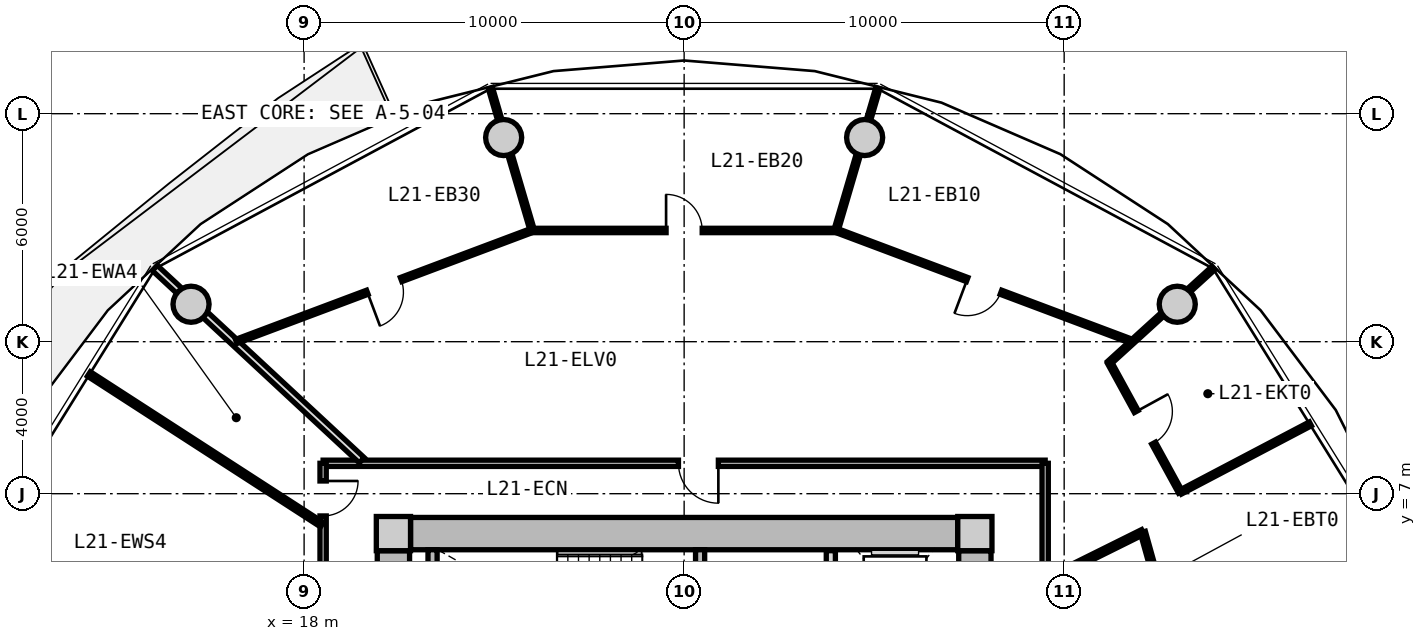
"""IFC4 building model, lengths in metres.
Left out: names, types, materials, properties, quantities, classifications, styles, units other than length and angle.
Written with IfcOpenShell. Run it as: python <this file> out.ifc"""

import sys

from ifc_helpers import new_model, si_unit, direction, frame, frame_2d, origin, origin_2d, place, context, subcontext, project, spatial, rectangle, circle, extrude, source, transform, mapped, element, fill, save


model = new_model("IFC4")
c1 = context("Model", 3, precision=1e-05, world=origin(), true_north=direction((0.0, 1.0)))
c2 = subcontext(c1, "Body", "Model", "MODEL_VIEW")
j1 = project(units=[si_unit("LENGTHUNIT", "METRE"), si_unit("PLANEANGLEUNIT", "RADIAN")], contexts=[c1])
p1 = place(None, origin())
s1 = spatial("IfcSite", under=j1, at=p1, CompositionType="ELEMENT")
p2 = place(p1, origin())
s2 = spatial("IfcBuilding", under=s1, at=p2, CompositionType="ELEMENT")
p3 = place(p2, frame((0.0, 0.0, 70.4)))
s3 = spatial("IfcBuildingStorey", under=s2, at=p3, CompositionType="ELEMENT", Elevation=70.4)
m1 = source(origin(), c2, "Body", "SweptSolid", [
    extrude(rectangle(XDim=0.9, YDim=0.9, at=origin_2d()), origin(), (0.0, 0.0, 1.0), 3.05),
])
for number, where, z_axis, x_axis in (
    (1, (35.65, 5.95, 0.0), (0.0, 0.0, 1.0), (1.0, 0.0, 0.0)),
    (2, (20.35, 5.95, 0.0), (0.0, 0.0, 1.0), (1.0, 0.0, 0.0)),
):
    element("IfcColumn", number, at=place(p3, frame(where, z_axis=z_axis, x_axis=x_axis)), inside=s3, PredefinedType="COLUMN", context=c2, shape_type="MappedRepresentation", body=[
        mapped(m1, transform((0.0, 0.0, 0.0), x_axis=(1.0, 0.0, 0.0), y_axis=(0.0, 1.0, 0.0), z_axis=(0.0, 0.0, 1.0), scale=1.0)),
    ])
m2 = source(origin(), c2, "Body", "SweptSolid", [
    extrude(rectangle(XDim=14.4, YDim=0.85, at=frame_2d((7.2, 0.0))), origin(), (0.0, 0.0, 1.0), 2.73),
])
p4 = place(p3, frame((20.8, 5.95, 0.0), z_axis=(0.0, 0.0, 1.0), x_axis=(1.0, 0.0, 0.0)))
e3 = element("IfcWall", 3, at=p4, inside=s3, PredefinedType="SHEAR", context=c2, shape_type="MappedRepresentation", body=[
    mapped(m2, transform((0.0, 0.0, 0.0), x_axis=(1.0, 0.0, 0.0), y_axis=(0.0, 1.0, 0.0), z_axis=(0.0, 0.0, 1.0), scale=1.0)),
])
m3 = source(origin(), c2, "Body", "SweptSolid", [
    extrude(rectangle(XDim=11.0, YDim=0.85, at=frame_2d((5.5, 0.0))), origin(), (0.0, 0.0, 1.0), 2.73),
])
p5 = place(p3, frame((20.35, -5.5, 0.0), z_axis=(0.0, 0.0, 1.0), x_axis=(0.0, 1.0, 0.0)))
e4 = element("IfcWall", 4, at=p5, inside=s3, PredefinedType="SHEAR", context=c2, shape_type="MappedRepresentation", body=[
    mapped(m3, transform((0.0, 0.0, 0.0), x_axis=(1.0, 0.0, 0.0), y_axis=(0.0, 1.0, 0.0), z_axis=(0.0, 0.0, 1.0), scale=1.0)),
])
p6 = place(p5, frame((3.8, 0.0, 0.0)))
e5 = element("IfcOpeningElement", 5, at=p6, cuts=e4, PredefinedType="OPENING", context=c2, shape_type="SweptSolid", body=[
    extrude(rectangle(XDim=1.2, YDim=2.15, at=frame_2d((0.6, 1.075))), frame((0.0, 0.435, 0.0), z_axis=(0.0, -1.0, 0.0), x_axis=(1.0, 0.0, 0.0)), (0.0, 0.0, 1.0), 0.87),
])
p7 = place(p3, frame((35.65, 5.5, 0.0), z_axis=(0.0, 0.0, 1.0), x_axis=(0.0, -1.0, 0.0)))
e6 = element("IfcWall", 6, at=p7, inside=s3, PredefinedType="SHEAR", context=c2, shape_type="MappedRepresentation", body=[
    mapped(m3, transform((0.0, 0.0, 0.0), x_axis=(1.0, 0.0, 0.0), y_axis=(0.0, 1.0, 0.0), z_axis=(0.0, 0.0, 1.0), scale=1.0)),
])
p8 = place(p7, frame((5.65, 0.0, 0.0)))
e7 = element("IfcOpeningElement", 7, at=p8, cuts=e6, PredefinedType="OPENING", context=c2, shape_type="SweptSolid", body=[
    extrude(rectangle(XDim=1.2, YDim=2.15, at=frame_2d((0.6, 1.075))), frame((0.0, 0.435, 0.0), z_axis=(0.0, -1.0, 0.0), x_axis=(1.0, 0.0, 0.0)), (0.0, 0.0, 1.0), 0.87),
])
m4 = source(origin(), c2, "Body", "SweptSolid", [
    extrude(circle(Radius=0.475, at=origin_2d()), origin(), (0.0, 0.0, 1.0), 3.05),
])
for number, where, z_axis, x_axis in (
    (8, (40.975, 11.985, 0.0), (0.0, 0.0, 1.0), (1.0, 0.0, 0.0)),
    (9, (32.749, 16.373, 0.0), (0.0, 0.0, 1.0), (1.0, 0.0, 0.0)),
    (10, (23.251, 16.373, 0.0), (0.0, 0.0, 1.0), (1.0, 0.0, 0.0)),
    (11, (15.025, 11.985, 0.0), (0.0, 0.0, 1.0), (1.0, 0.0, 0.0)),
):
    element("IfcColumn", number, at=place(p3, frame(where, z_axis=z_axis, x_axis=x_axis)), inside=s3, PredefinedType="COLUMN", context=c2, shape_type="MappedRepresentation", body=[
        mapped(m4, transform((0.0, 0.0, 0.0), x_axis=(1.0, 0.0, 0.0), y_axis=(0.0, 1.0, 0.0), z_axis=(0.0, 0.0, 1.0), scale=1.0)),
    ])
m5 = source(origin(), c2, "Body", "SweptSolid", [
    extrude(rectangle(XDim=3.075, YDim=0.24, at=frame_2d((1.538, 0.0))), origin(), (0.0, 0.0, 1.0), 2.73),
])
p9 = place(p3, frame((21.38, 2.45, 0.0), z_axis=(0.0, 0.0, 1.0), x_axis=(0.0, 1.0, 0.0)))
e12 = element("IfcWall", 12, at=p9, inside=s3, PredefinedType="PARTITIONING", context=c2, shape_type="MappedRepresentation", body=[
    mapped(m5, transform((0.0, 0.0, 0.0), x_axis=(1.0, 0.0, 0.0), y_axis=(0.0, 1.0, 0.0), z_axis=(0.0, 0.0, 1.0), scale=1.0)),
])
p10 = place(p3, frame((28.42, 2.45, 0.0), z_axis=(0.0, 0.0, 1.0), x_axis=(0.0, 1.0, 0.0)))
e13 = element("IfcWall", 13, at=p10, inside=s3, PredefinedType="PARTITIONING", context=c2, shape_type="MappedRepresentation", body=[
    mapped(m5, transform((0.0, 0.0, 0.0), x_axis=(1.0, 0.0, 0.0), y_axis=(0.0, 1.0, 0.0), z_axis=(0.0, 0.0, 1.0), scale=1.0)),
])
p11 = place(p10, frame((0.55, 0.0, 0.0)))
e14 = element("IfcOpeningElement", 14, at=p11, cuts=e13, PredefinedType="OPENING", context=c2, shape_type="SweptSolid", body=[
    extrude(rectangle(XDim=1.1, YDim=2.15, at=frame_2d((0.55, 1.075))), frame((0.0, 0.13, 0.0), z_axis=(0.0, -1.0, 0.0), x_axis=(1.0, 0.0, 0.0)), (0.0, 0.0, 1.0), 0.26),
])
m6 = source(origin(), c2, "Body", "SweptSolid", [
    extrude(rectangle(XDim=5.0, YDim=0.24, at=frame_2d((2.5, 0.0))), origin(), (0.0, 0.0, 1.0), 2.715),
])
p12 = place(p3, frame((31.86, 0.5, 0.0), z_axis=(0.0, 0.0, 1.0), x_axis=(0.0, 1.0, 0.0)))
e15 = element("IfcWall", 15, at=p12, inside=s3, PredefinedType="PARTITIONING", context=c2, shape_type="MappedRepresentation", body=[
    mapped(m6, transform((0.0, 0.0, 0.0), x_axis=(1.0, 0.0, 0.0), y_axis=(0.0, 1.0, 0.0), z_axis=(0.0, 0.0, 1.0), scale=1.0)),
])
p13 = place(p12, frame((3.05, 0.0, 0.0)))
e16 = element("IfcOpeningElement", 16, at=p13, cuts=e15, PredefinedType="OPENING", context=c2, shape_type="SweptSolid", body=[
    extrude(rectangle(XDim=1.3, YDim=2.2, at=frame_2d((0.65, 1.1))), frame((0.0, 0.13, 0.0), z_axis=(0.0, -1.0, 0.0), x_axis=(1.0, 0.0, 0.0)), (0.0, 0.0, 1.0), 0.26),
])
p14 = place(p12, frame((0.55, 0.0, 0.0)))
e17 = element("IfcOpeningElement", 17, at=p14, cuts=e15, PredefinedType="OPENING", context=c2, shape_type="SweptSolid", body=[
    extrude(rectangle(XDim=1.3, YDim=2.2, at=frame_2d((0.65, 1.1))), frame((0.0, 0.13, 0.0), z_axis=(0.0, -1.0, 0.0), x_axis=(1.0, 0.0, 0.0)), (0.0, 0.0, 1.0), 0.26),
])
m7 = source(origin(), c2, "Body", "SweptSolid", [
    extrude(rectangle(XDim=19.0, YDim=0.165, at=frame_2d((9.5, 0.0))), origin(), (0.0, 0.0, 1.0), 2.715),
])
p15 = place(p3, frame((18.5, 7.8, 0.0), z_axis=(0.0, 0.0, 1.0), x_axis=(1.0, 0.0, 0.0)))
e18 = element("IfcWall", 18, at=p15, inside=s3, PredefinedType="PARTITIONING", context=c2, shape_type="MappedRepresentation", body=[
    mapped(m7, transform((0.0, 0.0, 0.0), x_axis=(1.0, 0.0, 0.0), y_axis=(0.0, 1.0, 0.0), z_axis=(0.0, 0.0, 1.0), scale=1.0)),
])
p16 = place(p15, frame((9.35, 0.0, 0.0)))
e19 = element("IfcOpeningElement", 19, at=p16, cuts=e18, PredefinedType="OPENING", context=c2, shape_type="SweptSolid", body=[
    extrude(rectangle(XDim=1.05, YDim=2.15, at=frame_2d((0.525, 1.075))), frame((0.0, 0.093, 0.0), z_axis=(0.0, -1.0, 0.0), x_axis=(1.0, 0.0, 0.0)), (0.0, 0.0, 1.0), 0.185),
])
m8 = source(origin(), c2, "Body", "SweptSolid", [
    extrude(rectangle(XDim=15.6, YDim=0.165, at=frame_2d((7.8, 0.0))), origin(), (0.0, 0.0, 1.0), 2.715),
])
p17 = place(p3, frame((18.5, -7.8, 0.0), z_axis=(0.0, 0.0, 1.0), x_axis=(0.0, 1.0, 0.0)))
e20 = element("IfcWall", 20, at=p17, inside=s3, PredefinedType="PARTITIONING", context=c2, shape_type="MappedRepresentation", body=[
    mapped(m8, transform((0.0, 0.0, 0.0), x_axis=(1.0, 0.0, 0.0), y_axis=(0.0, 1.0, 0.0), z_axis=(0.0, 0.0, 1.0), scale=1.0)),
])
p18 = place(p17, frame((14.215, 0.0, 0.0)))
e21 = element("IfcOpeningElement", 21, at=p18, cuts=e20, PredefinedType="OPENING", context=c2, shape_type="SweptSolid", body=[
    extrude(rectangle(XDim=0.92, YDim=2.1, at=frame_2d((0.46, 1.05))), frame((0.0, 0.093, 0.0), z_axis=(0.0, -1.0, 0.0), x_axis=(1.0, 0.0, 0.0)), (0.0, 0.0, 1.0), 0.185),
])
p19 = place(p17, frame((11.609, 0.0, 0.0)))
e22 = element("IfcOpeningElement", 22, at=p19, cuts=e20, PredefinedType="OPENING", context=c2, shape_type="SweptSolid", body=[
    extrude(rectangle(XDim=0.92, YDim=2.1, at=frame_2d((0.46, 1.05))), frame((0.0, 0.093, 0.0), z_axis=(0.0, -1.0, 0.0), x_axis=(1.0, 0.0, 0.0)), (0.0, 0.0, 1.0), 0.185),
])
p20 = place(p17, frame((7.175, 0.0, 0.0)))
e23 = element("IfcOpeningElement", 23, at=p20, cuts=e20, PredefinedType="OPENING", context=c2, shape_type="SweptSolid", body=[
    extrude(rectangle(XDim=1.25, YDim=2.2, at=frame_2d((0.625, 1.1))), frame((0.0, 0.093, 0.0), z_axis=(0.0, -1.0, 0.0), x_axis=(1.0, 0.0, 0.0)), (0.0, 0.0, 1.0), 0.185),
])
p21 = place(p3, frame((37.5, 7.8, 0.0), z_axis=(0.0, 0.0, 1.0), x_axis=(0.0, -1.0, 0.0)))
e24 = element("IfcWall", 24, at=p21, inside=s3, PredefinedType="PARTITIONING", context=c2, shape_type="MappedRepresentation", body=[
    mapped(m8, transform((0.0, 0.0, 0.0), x_axis=(1.0, 0.0, 0.0), y_axis=(0.0, 1.0, 0.0), z_axis=(0.0, 0.0, 1.0), scale=1.0)),
])
p22 = place(p21, frame((8.835, 0.0, 0.0)))
e25 = element("IfcOpeningElement", 25, at=p22, cuts=e24, PredefinedType="OPENING", context=c2, shape_type="SweptSolid", body=[
    extrude(rectangle(XDim=1.05, YDim=2.15, at=frame_2d((0.525, 1.075))), frame((0.0, 0.093, 0.0), z_axis=(0.0, -1.0, 0.0), x_axis=(1.0, 0.0, 0.0)), (0.0, 0.0, 1.0), 0.185),
])
m9 = source(origin(), c2, "Body", "SweptSolid", [
    extrude(rectangle(XDim=7.435, YDim=0.19, at=frame_2d((3.717, 0.0))), origin(), (0.0, 0.0, 1.0), 2.165),
])
p23 = place(p3, frame((19.517, 7.88, 0.0), z_axis=(0.0, 0.0, 1.0), x_axis=(-0.732651956848, 0.680603489652, 0.0)))
e26 = element("IfcWall", 26, at=p23, inside=s3, PredefinedType="PARTITIONING", context=c2, shape_type="MappedRepresentation", body=[
    mapped(m9, transform((0.0, 0.0, 0.0), x_axis=(1.0, 0.0, 0.0), y_axis=(0.0, 1.0, 0.0), z_axis=(0.0, 0.0, 1.0), scale=1.0)),
])
m10 = source(origin(), c2, "Body", "SweptSolid", [
    extrude(rectangle(XDim=8.32, YDim=0.115, at=frame_2d((4.16, 0.0))), origin(), (0.0, 0.0, 1.0), 2.715),
])
p24 = place(p3, frame((39.786, 11.006, 0.0), z_axis=(0.0, 0.0, 1.0), x_axis=(-0.936180763098, 0.351518959382, 0.0)))
e27 = element("IfcWall", 27, at=p24, inside=s3, PredefinedType="PARTITIONING", context=c2, shape_type="MappedRepresentation", body=[
    mapped(m10, transform((0.0, 0.0, 0.0), x_axis=(1.0, 0.0, 0.0), y_axis=(0.0, 1.0, 0.0), z_axis=(0.0, 0.0, 1.0), scale=1.0)),
])
p25 = place(p24, frame((3.685, 0.0, 0.0)))
e28 = element("IfcOpeningElement", 28, at=p25, cuts=e27, PredefinedType="OPENING", context=c2, shape_type="SweptSolid", body=[
    extrude(rectangle(XDim=0.95, YDim=2.1, at=frame_2d((0.475, 1.05))), frame((0.0, 0.067, 0.0), z_axis=(0.0, -1.0, 0.0), x_axis=(1.0, 0.0, 0.0)), (0.0, 0.0, 1.0), 0.135),
])
m11 = source(origin(), c2, "Body", "SweptSolid", [
    extrude(rectangle(XDim=3.713, YDim=0.115, at=frame_2d((1.856, 0.0))), origin(), (0.0, 0.0, 1.0), 2.165),
])
p26 = place(p3, frame((39.183, 10.442, 0.0), z_axis=(0.0, 0.0, 1.0), x_axis=(0.739877587881, 0.67274152165, 0.0)))
e29 = element("IfcWall", 29, at=p26, inside=s3, PredefinedType="PARTITIONING", context=c2, shape_type="MappedRepresentation", body=[
    mapped(m11, transform((0.0, 0.0, 0.0), x_axis=(1.0, 0.0, 0.0), y_axis=(0.0, 1.0, 0.0), z_axis=(0.0, 0.0, 1.0), scale=1.0)),
])
m12 = source(origin(), c2, "Body", "SweptSolid", [
    extrude(rectangle(XDim=7.993, YDim=0.115, at=frame_2d((3.996, 0.0))), origin(), (0.0, 0.0, 1.0), 2.715),
])
p27 = place(p3, frame((31.996, 13.927, 0.0), z_axis=(0.0, 0.0, 1.0), x_axis=(-1.0, 0.0, 0.0)))
e30 = element("IfcWall", 30, at=p27, inside=s3, PredefinedType="PARTITIONING", context=c2, shape_type="MappedRepresentation", body=[
    mapped(m12, transform((0.0, 0.0, 0.0), x_axis=(1.0, 0.0, 0.0), y_axis=(0.0, 1.0, 0.0), z_axis=(0.0, 0.0, 1.0), scale=1.0)),
])
p28 = place(p27, frame((3.521, 0.0, 0.0)))
e31 = element("IfcOpeningElement", 31, at=p28, cuts=e30, PredefinedType="OPENING", context=c2, shape_type="SweptSolid", body=[
    extrude(rectangle(XDim=0.95, YDim=2.1, at=frame_2d((0.475, 1.05))), frame((0.0, 0.067, 0.0), z_axis=(0.0, -1.0, 0.0), x_axis=(1.0, 0.0, 0.0)), (0.0, 0.0, 1.0), 0.135),
])
m13 = source(origin(), c2, "Body", "SweptSolid", [
    extrude(rectangle(XDim=3.908, YDim=0.115, at=frame_2d((1.954, 0.0))), origin(), (0.0, 0.0, 1.0), 2.165),
])
p29 = place(p3, frame((31.996, 13.927, 0.0), z_axis=(0.0, 0.0, 1.0), x_axis=(0.282047948883, 0.959400309845, 0.0)))
e32 = element("IfcWall", 32, at=p29, inside=s3, PredefinedType="PARTITIONING", context=c2, shape_type="MappedRepresentation", body=[
    mapped(m13, transform((0.0, 0.0, 0.0), x_axis=(1.0, 0.0, 0.0), y_axis=(0.0, 1.0, 0.0), z_axis=(0.0, 0.0, 1.0), scale=1.0)),
])
p30 = place(p3, frame((24.003, 13.93, 0.0), z_axis=(0.0, 0.0, 1.0), x_axis=(-0.936180763098, -0.351518959382, 0.0)))
e33 = element("IfcWall", 33, at=p30, inside=s3, PredefinedType="PARTITIONING", context=c2, shape_type="MappedRepresentation", body=[
    mapped(m10, transform((0.0, 0.0, 0.0), x_axis=(1.0, 0.0, 0.0), y_axis=(0.0, 1.0, 0.0), z_axis=(0.0, 0.0, 1.0), scale=1.0)),
])
p31 = place(p30, frame((3.685, 0.0, 0.0)))
e34 = element("IfcOpeningElement", 34, at=p31, cuts=e33, PredefinedType="OPENING", context=c2, shape_type="SweptSolid", body=[
    extrude(rectangle(XDim=0.95, YDim=2.1, at=frame_2d((0.475, 1.05))), frame((0.0, 0.067, 0.0), z_axis=(0.0, -1.0, 0.0), x_axis=(1.0, 0.0, 0.0)), (0.0, 0.0, 1.0), 0.135),
])
m14 = source(origin(), c2, "Body", "SweptSolid", [
    extrude(rectangle(XDim=3.905, YDim=0.115, at=frame_2d((1.952, 0.0))), origin(), (0.0, 0.0, 1.0), 2.165),
])
p32 = place(p3, frame((24.003, 13.93, 0.0), z_axis=(0.0, 0.0, 1.0), x_axis=(-0.282037692958, 0.959403324859, 0.0)))
e35 = element("IfcWall", 35, at=p32, inside=s3, PredefinedType="PARTITIONING", context=c2, shape_type="MappedRepresentation", body=[
    mapped(m14, transform((0.0, 0.0, 0.0), x_axis=(1.0, 0.0, 0.0), y_axis=(0.0, 1.0, 0.0), z_axis=(0.0, 0.0, 1.0), scale=1.0)),
])
m15 = source(origin(), c2, "Body", "SweptSolid", [
    extrude(rectangle(XDim=2.834, YDim=0.14, at=frame_2d((1.417, 0.0))), origin(), (0.0, 0.0, 1.0), 2.715),
])
p33 = place(p3, frame((37.53, 4.732, 0.0), z_axis=(0.0, 0.0, 1.0), x_axis=(0.895681174462, 0.444696788513, 0.0)))
e36 = element("IfcWall", 36, at=p33, inside=s3, PredefinedType="PARTITIONING", context=c2, shape_type="MappedRepresentation", body=[
    mapped(m15, transform((0.0, 0.0, 0.0), x_axis=(1.0, 0.0, 0.0), y_axis=(0.0, 1.0, 0.0), z_axis=(0.0, 0.0, 1.0), scale=1.0)),
])
m16 = source(origin(), c2, "Body", "SweptSolid", [
    extrude(rectangle(XDim=2.885, YDim=0.14, at=frame_2d((1.442, 0.0))), origin(), (0.0, 0.0, 1.0), 2.715),
])
p34 = place(p3, frame((40.069, 5.992, 0.0), z_axis=(0.0, 0.0, 1.0), x_axis=(0.269799431837, -0.962916541856, 0.0)))
e37 = element("IfcWall", 37, at=p34, inside=s3, PredefinedType="PARTITIONING", context=c2, shape_type="MappedRepresentation", body=[
    mapped(m16, transform((0.0, 0.0, 0.0), x_axis=(1.0, 0.0, 0.0), y_axis=(0.0, 1.0, 0.0), z_axis=(0.0, 0.0, 1.0), scale=1.0)),
])
p35 = place(p34, frame((0.982, 0.0, 0.0)))
e38 = element("IfcOpeningElement", 38, at=p35, cuts=e37, PredefinedType="OPENING", context=c2, shape_type="SweptSolid", body=[
    extrude(rectangle(XDim=0.92, YDim=2.1, at=frame_2d((0.46, 1.05))), frame((0.0, 0.08, 0.0), z_axis=(0.0, -1.0, 0.0), x_axis=(1.0, 0.0, 0.0)), (0.0, 0.0, 1.0), 0.16),
])
m17 = source(origin(), c2, "Body", "SweptSolid", [
    extrude(rectangle(XDim=3.864, YDim=0.115, at=frame_2d((1.932, 0.0))), origin(), (0.0, 0.0, 1.0), 2.715),
])
p36 = place(p3, frame((41.06, 7.041, 0.0), z_axis=(0.0, 0.0, 1.0), x_axis=(0.885194959803, 0.465220252289, 0.0)))
e39 = element("IfcWall", 39, at=p36, inside=s3, PredefinedType="PARTITIONING", context=c2, shape_type="MappedRepresentation", body=[
    mapped(m17, transform((0.0, 0.0, 0.0), x_axis=(1.0, 0.0, 0.0), y_axis=(0.0, 1.0, 0.0), z_axis=(0.0, 0.0, 1.0), scale=1.0)),
])
m18 = source(origin(), c2, "Body", "SweptSolid", [
    extrude(rectangle(XDim=3.888, YDim=0.115, at=frame_2d((1.944, 0.0))), origin(), (0.0, 0.0, 1.0), 2.715),
])
p37 = place(p3, frame((41.06, 7.041, 0.0), z_axis=(0.0, 0.0, 1.0), x_axis=(-0.480382482853, 0.877059103007, 0.0)))
e40 = element("IfcWall", 40, at=p37, inside=s3, PredefinedType="PARTITIONING", context=c2, shape_type="MappedRepresentation", body=[
    mapped(m18, transform((0.0, 0.0, 0.0), x_axis=(1.0, 0.0, 0.0), y_axis=(0.0, 1.0, 0.0), z_axis=(0.0, 0.0, 1.0), scale=1.0)),
])
p38 = place(p37, frame((1.469, 0.0, 0.0)))
e41 = element("IfcOpeningElement", 41, at=p38, cuts=e40, PredefinedType="OPENING", context=c2, shape_type="SweptSolid", body=[
    extrude(rectangle(XDim=0.95, YDim=2.1, at=frame_2d((0.475, 1.05))), frame((0.0, 0.067, 0.0), z_axis=(0.0, -1.0, 0.0), x_axis=(1.0, 0.0, 0.0)), (0.0, 0.0, 1.0), 0.135),
])
m19 = source(origin(), c2, "Body", "SweptSolid", [
    extrude(rectangle(XDim=7.304, YDim=0.14, at=frame_2d((3.652, 0.0))), origin(), (0.0, 0.0, 1.0), 2.715),
])
p39 = place(p3, frame((18.47, 6.185, 0.0), z_axis=(0.0, 0.0, 1.0), x_axis=(-0.83973870965, 0.54299069929, 0.0)))
e42 = element("IfcWall", 42, at=p39, inside=s3, PredefinedType="PARTITIONING", context=c2, shape_type="MappedRepresentation", body=[
    mapped(m19, transform((0.0, 0.0, 0.0), x_axis=(1.0, 0.0, 0.0), y_axis=(0.0, 1.0, 0.0), z_axis=(0.0, 0.0, 1.0), scale=1.0)),
])
m20 = source(origin(), c2, "Body", "SweptSolid", [
    extrude(rectangle(XDim=1.05, YDim=2.15, at=frame_2d((0.525, 1.075))), frame((0.0, 0.025, 0.0), z_axis=(0.0, -1.0, 0.0), x_axis=(1.0, 0.0, 0.0)), (0.0, 0.0, 1.0), 0.05),
])
p40 = place(p16, frame((1.05, 0.0, 0.0), z_axis=(0.0, 0.0, 1.0), x_axis=(-1.0, 0.0, 0.0)))
e43 = element("IfcDoor", 43, at=p40, inside=s3, OperationType="SINGLE_SWING_LEFT", PredefinedType="DOOR", context=c2, shape_type="MappedRepresentation", body=[
    mapped(m20, transform((0.0, 0.0, 0.0), x_axis=(1.0, 0.0, 0.0), y_axis=(0.0, 1.0, 0.0), z_axis=(0.0, 0.0, 1.0), scale=1.0)),
])
fill(e19, e43)
m21 = source(origin(), c2, "Body", "SweptSolid", [
    extrude(rectangle(XDim=0.95, YDim=2.1, at=frame_2d((0.475, 1.05))), frame((0.0, 0.025, 0.0), z_axis=(0.0, -1.0, 0.0), x_axis=(1.0, 0.0, 0.0)), (0.0, 0.0, 1.0), 0.05),
])
p41 = place(p38, frame((0.95, 0.0, 0.0), z_axis=(0.0, 0.0, 1.0), x_axis=(-1.0, 0.0, 0.0)))
e44 = element("IfcDoor", 44, at=p41, inside=s3, OperationType="SINGLE_SWING_LEFT", PredefinedType="DOOR", context=c2, shape_type="MappedRepresentation", body=[
    mapped(m21, transform((0.0, 0.0, 0.0), x_axis=(1.0, 0.0, 0.0), y_axis=(0.0, 1.0, 0.0), z_axis=(0.0, 0.0, 1.0), scale=1.0)),
])
fill(e41, e44)
p42 = place(p25, origin())
e45 = element("IfcDoor", 45, at=p42, inside=s3, OperationType="SINGLE_SWING_RIGHT", PredefinedType="DOOR", context=c2, shape_type="MappedRepresentation", body=[
    mapped(m21, transform((0.0, 0.0, 0.0), x_axis=(1.0, 0.0, 0.0), y_axis=(0.0, 1.0, 0.0), z_axis=(0.0, 0.0, 1.0), scale=1.0)),
])
fill(e28, e45)
p43 = place(p28, frame((0.95, 0.0, 0.0), z_axis=(0.0, 0.0, 1.0), x_axis=(-1.0, 0.0, 0.0)))
e46 = element("IfcDoor", 46, at=p43, inside=s3, OperationType="SINGLE_SWING_LEFT", PredefinedType="DOOR", context=c2, shape_type="MappedRepresentation", body=[
    mapped(m21, transform((0.0, 0.0, 0.0), x_axis=(1.0, 0.0, 0.0), y_axis=(0.0, 1.0, 0.0), z_axis=(0.0, 0.0, 1.0), scale=1.0)),
])
fill(e31, e46)
p44 = place(p31, origin())
e47 = element("IfcDoor", 47, at=p44, inside=s3, OperationType="SINGLE_SWING_RIGHT", PredefinedType="DOOR", context=c2, shape_type="MappedRepresentation", body=[
    mapped(m21, transform((0.0, 0.0, 0.0), x_axis=(1.0, 0.0, 0.0), y_axis=(0.0, 1.0, 0.0), z_axis=(0.0, 0.0, 1.0), scale=1.0)),
])
fill(e34, e47)
m22 = source(origin(), c2, "Body", "SweptSolid", [
    extrude(rectangle(XDim=0.92, YDim=2.1, at=frame_2d((0.46, 1.05))), frame((0.0, 0.025, 0.0), z_axis=(0.0, -1.0, 0.0), x_axis=(1.0, 0.0, 0.0)), (0.0, 0.0, 1.0), 0.05),
])
p45 = place(p18, frame((0.92, 0.0, 0.0), z_axis=(0.0, 0.0, 1.0), x_axis=(-1.0, 0.0, 0.0)))
e48 = element("IfcDoor", 48, at=p45, inside=s3, OperationType="SINGLE_SWING_LEFT", PredefinedType="DOOR", context=c2, shape_type="MappedRepresentation", body=[
    mapped(m22, transform((0.0, 0.0, 0.0), x_axis=(1.0, 0.0, 0.0), y_axis=(0.0, 1.0, 0.0), z_axis=(0.0, 0.0, 1.0), scale=1.0)),
])
fill(e21, e48)
save(model, sys.argv[1])
